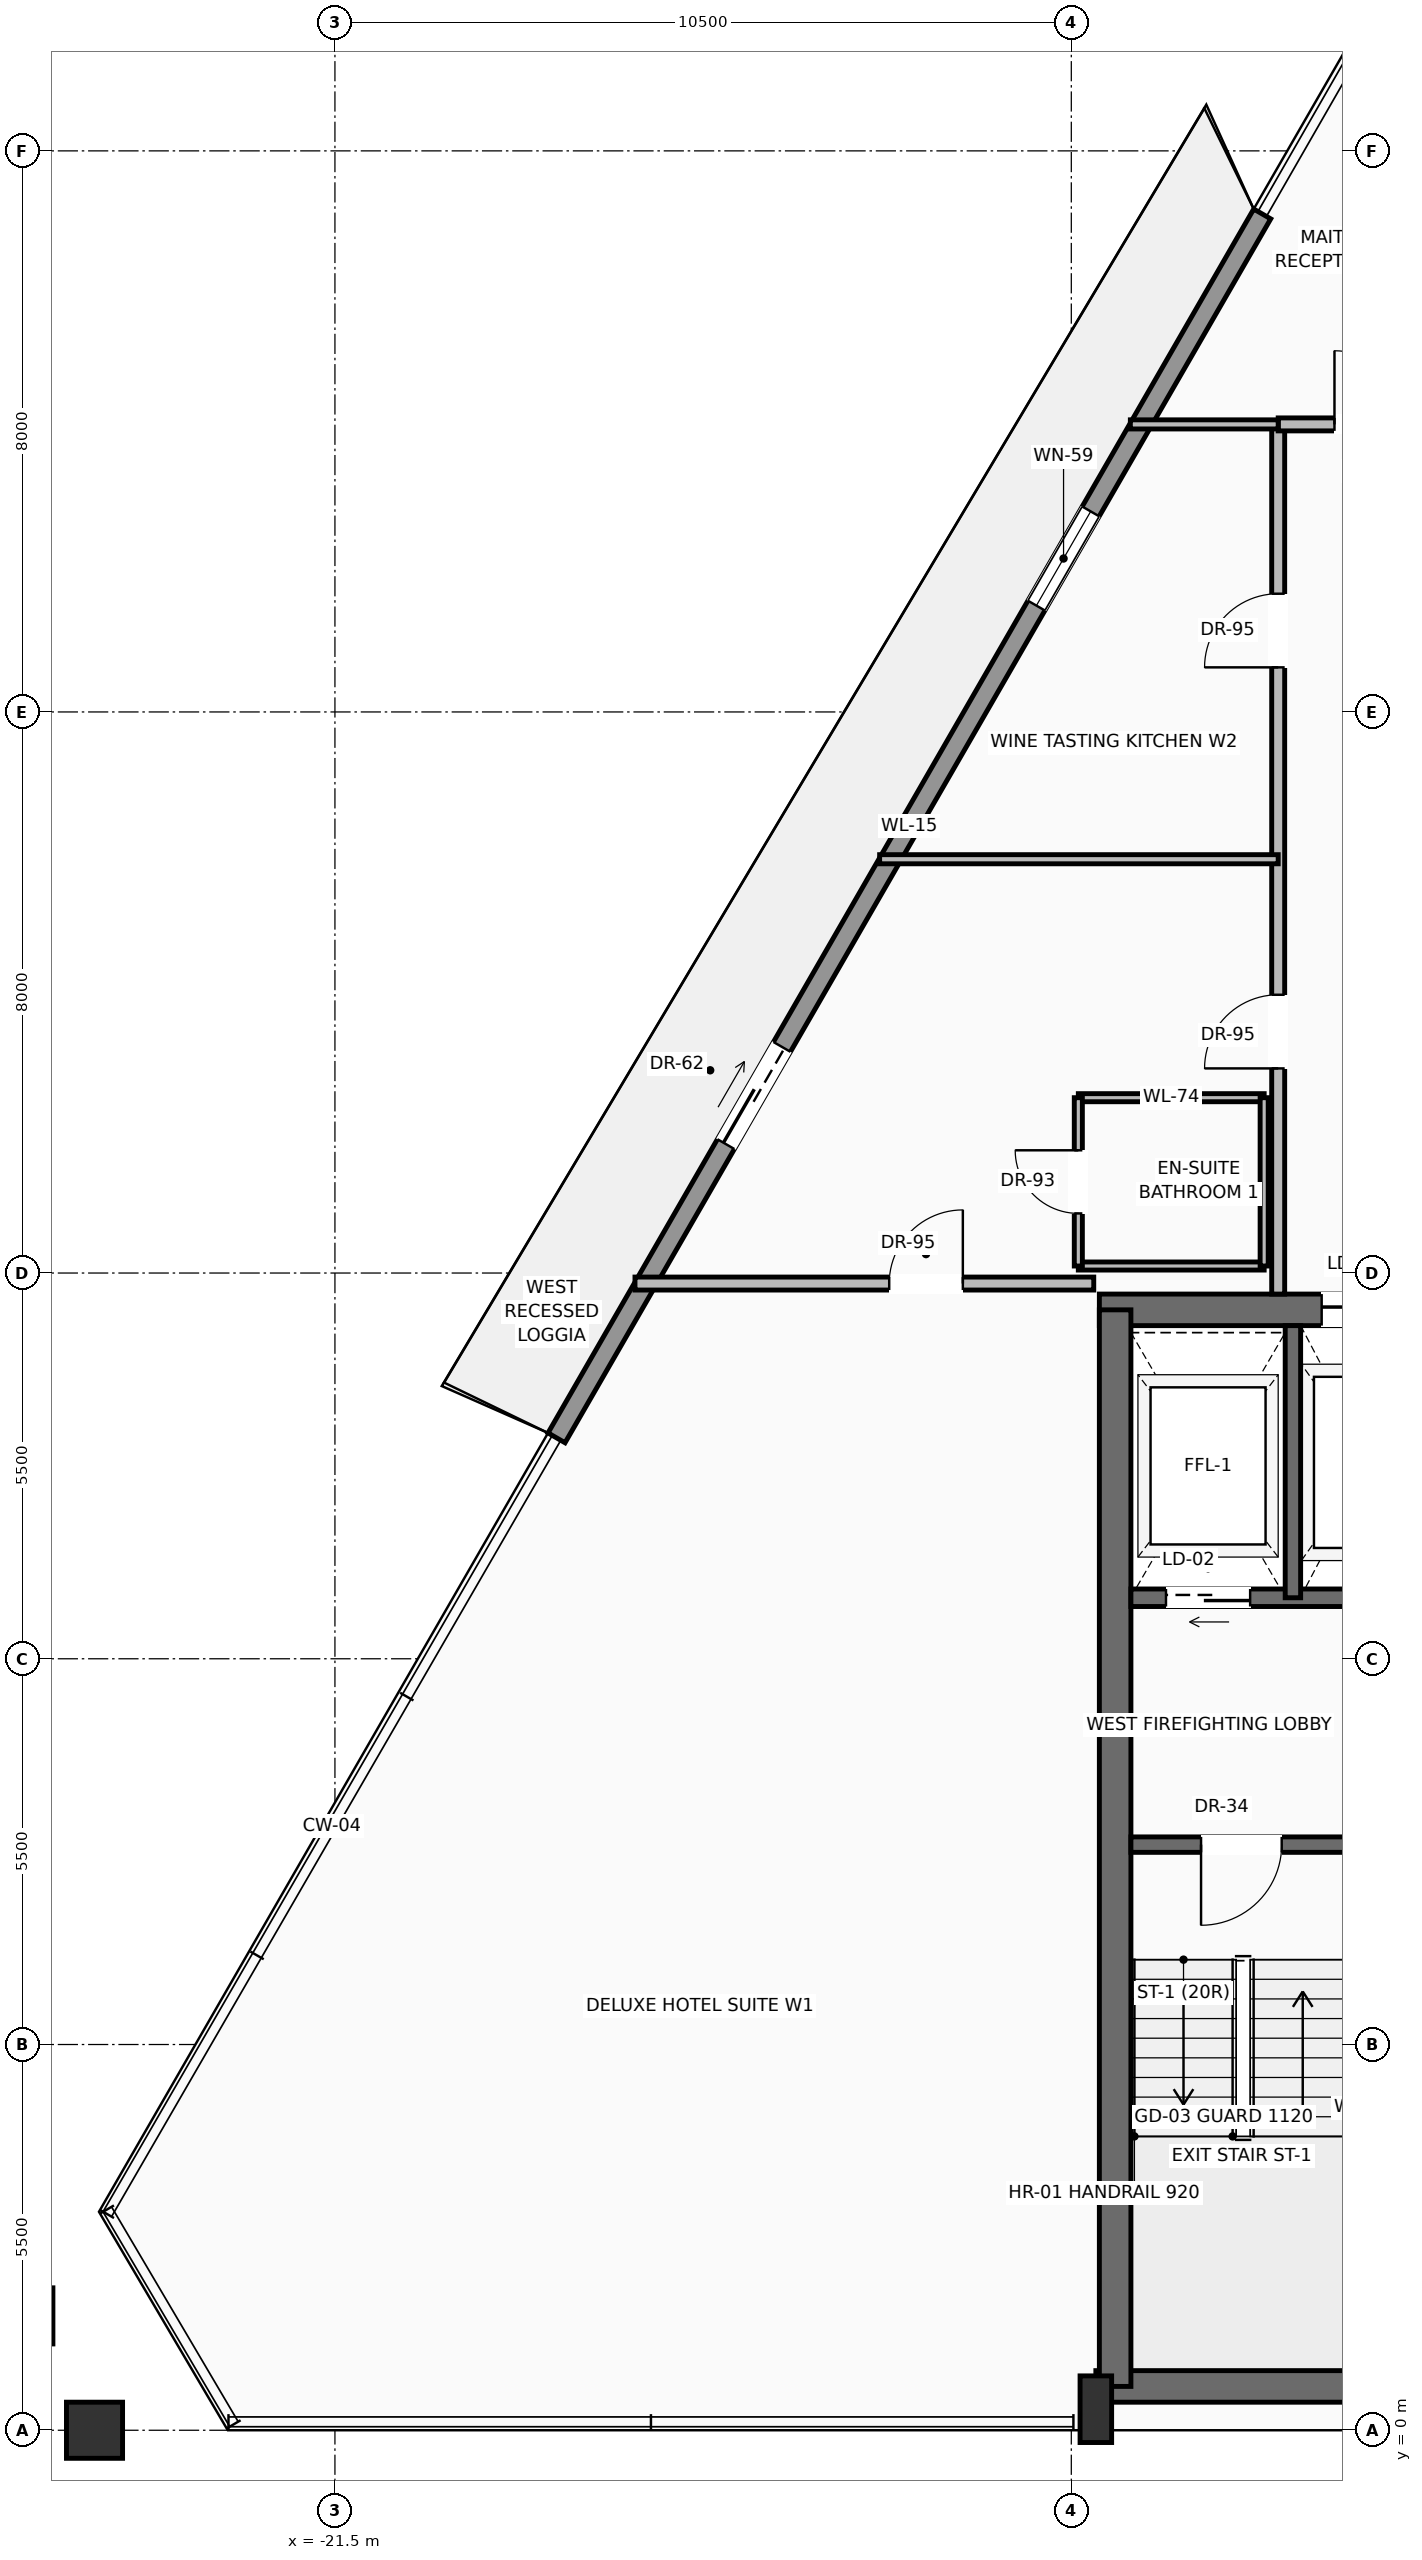
"""IFC4 building model, lengths in metres.
Left out: names, types, materials, properties, quantities, classifications, styles, units other than length and angle.
Written with IfcOpenShell. Run it as: python <this file> out.ifc"""

import sys

from ifc_helpers import new_model, si_unit, direction, frame, frame_2d, origin, origin_2d, place, context, subcontext, project, spatial, rectangle, hollow_rectangle, extrude, source, transform, mapped, element, fill, save


model = new_model("IFC4")
c1 = context("Model", 3, precision=1e-05, world=origin(), true_north=direction((0.0, 1.0)))
c2 = subcontext(c1, "Body", "Model", "MODEL_VIEW")
j1 = project(units=[si_unit("LENGTHUNIT", "METRE"), si_unit("PLANEANGLEUNIT", "RADIAN")], contexts=[c1])
p1 = place(None, origin())
s1 = spatial("IfcSite", under=j1, at=p1, CompositionType="ELEMENT")
p2 = place(p1, origin())
s2 = spatial("IfcBuilding", under=s1, at=p2, CompositionType="ELEMENT")
p3 = place(p2, frame((0.0, 0.0, 279.9)))
s3 = spatial("IfcBuildingStorey", under=s2, at=p3, CompositionType="ELEMENT", Elevation=279.9)
p4 = place(p3, frame((-10.65, 0.625, 0.0), z_axis=(0.0, 0.0, 1.0), x_axis=(1.0, 0.0, 0.0)))
e1 = element("IfcWall", 1, at=p4, inside=s3, PredefinedType="SHEAR", context=c2, shape_type="SweptSolid", body=[
    extrude(rectangle(XDim=21.3, YDim=0.45, at=frame_2d((10.65, 0.0))), origin(), (0.0, 0.0, 1.0), 3.24),
])
p5 = place(p3, frame((-10.6, 15.975, 0.0), z_axis=(0.0, 0.0, 1.0), x_axis=(1.0, 0.0, 0.0)))
e2 = element("IfcWall", 2, at=p5, inside=s3, PredefinedType="SHEAR", context=c2, shape_type="SweptSolid", body=[
    extrude(rectangle(XDim=21.2, YDim=0.45, at=frame_2d((10.6, 0.0))), origin(), (0.0, 0.0, 1.0), 3.24),
])
p6 = place(p5, frame((3.17, 0.0, 0.0)))
e3 = element("IfcOpeningElement", 3, at=p6, cuts=e2, PredefinedType="OPENING", context=c2, shape_type="SweptSolid", body=[
    extrude(rectangle(XDim=1.3, YDim=2.3, at=frame_2d((0.65, 1.15))), frame((0.0, 0.235, 0.0), z_axis=(0.0, -1.0, 0.0), x_axis=(1.0, 0.0, 0.0)), (0.0, 0.0, 1.0), 0.47),
])
p7 = place(p5, frame((9.6, 0.0, 0.0)))
e4 = element("IfcOpeningElement", 4, at=p7, cuts=e2, PredefinedType="OPENING", context=c2, shape_type="SweptSolid", body=[
    extrude(rectangle(XDim=2.0, YDim=2.4, at=frame_2d((1.0, 1.2))), frame((0.0, 0.235, 0.0), z_axis=(0.0, -1.0, 0.0), x_axis=(1.0, 0.0, 0.0)), (0.0, 0.0, 1.0), 0.47),
])
p8 = place(p3, frame((-10.375, 0.625, 0.0), z_axis=(0.0, 0.0, 1.0), x_axis=(0.0, 1.0, 0.0)))
e5 = element("IfcWall", 5, at=p8, inside=s3, PredefinedType="SHEAR", context=c2, shape_type="SweptSolid", body=[
    extrude(rectangle(XDim=15.35, YDim=0.45, at=frame_2d((7.675, 0.0))), origin(), (0.0, 0.0, 1.0), 3.24),
])
m1 = source(origin(), c2, "Body", "SweptSolid", [
    extrude(rectangle(XDim=0.45, YDim=0.95, at=origin_2d()), origin(), (0.0, 0.0, 1.0), 3.45),
])
p9 = place(p3, frame((-10.65, 0.3, 0.0), z_axis=(0.0, 0.0, 1.0), x_axis=(1.0, 0.0, 0.0)))
e6 = element("IfcColumn", 6, at=p9, inside=s3, PredefinedType="PILASTER", context=c2, shape_type="MappedRepresentation", body=[
    mapped(m1, transform((0.0, 0.0, 0.0), scale=1.0)),
])
m2 = source(origin(), c2, "Body", "SweptSolid", [
    extrude(hollow_rectangle(XDim=0.8, YDim=0.8, WallThickness=0.04, at=origin_2d()), origin(), (0.0, 0.0, 1.0), 3.441),
])
p10 = place(p3, frame((-24.928, 0.0, 0.004), z_axis=(0.001560724546, 0.0, 0.999998782069), x_axis=(0.0, 1.0, 0.0)))
e7 = element("IfcColumn", 7, at=p10, inside=s3, PredefinedType="COLUMN", context=c2, shape_type="MappedRepresentation", body=[
    mapped(m2, transform((0.0, 0.0, 0.0), scale=1.0)),
])
m3 = source(origin(), c2, "Body", "SweptSolid", [
    extrude(hollow_rectangle(XDim=0.8, YDim=0.8, WallThickness=0.04, at=origin_2d()), origin(), (0.0, 0.0, 1.0), 3.442),
])
p11 = place(p3, frame((-25.921, 1.631, 0.004), z_axis=(0.012766825134, -0.016384092255, 0.999784261577), x_axis=(0.788800290179, 0.614649576762, 0.0)))
e8 = element("IfcColumn", 8, at=p11, inside=s3, PredefinedType="COLUMN", context=c2, shape_type="MappedRepresentation", body=[
    mapped(m3, transform((0.0, 0.0, 0.0), scale=1.0)),
])
p12 = place(p3, frame((-18.34, 14.15, 0.0), z_axis=(0.0, 0.0, 1.0), x_axis=(0.499519590366, 0.866302590808, 0.0)))
e9 = element("IfcWall", 9, at=p12, inside=s3, PredefinedType="SOLIDWALL", context=c2, shape_type="SweptSolid", body=[
    extrude(rectangle(XDim=20.144, YDim=0.28, at=frame_2d((10.072, 0.0))), origin(), (0.0, 0.0, 1.0), 2.82),
])
p13 = place(p12, frame((4.834, 0.0, 0.0)))
e10 = element("IfcOpeningElement", 10, at=p13, cuts=e9, PredefinedType="OPENING", context=c2, shape_type="SweptSolid", body=[
    extrude(rectangle(XDim=1.6, YDim=2.35, at=frame_2d((0.8, 1.175))), frame((0.0, 0.15, 0.0), z_axis=(0.0, -1.0, 0.0), x_axis=(1.0, 0.0, 0.0)), (0.0, 0.0, 1.0), 0.3),
])
p14 = place(p12, frame((13.698, 0.0, 0.9)))
e11 = element("IfcOpeningElement", 11, at=p14, cuts=e9, PredefinedType="OPENING", context=c2, shape_type="SweptSolid", body=[
    extrude(rectangle(XDim=1.55, YDim=1.75, at=frame_2d((0.775, 0.875))), frame((0.0, 0.15, 0.0), z_axis=(0.0, -1.0, 0.0), x_axis=(1.0, 0.0, 0.0)), (0.0, 0.0, 1.0), 0.3),
])
p15 = place(p3, frame((-5.5, 8.35, 0.0), z_axis=(0.0, 0.0, 1.0), x_axis=(-1.0, 0.0, 0.0)))
e12 = element("IfcWall", 12, at=p15, inside=s3, PredefinedType="SOLIDWALL", context=c2, shape_type="SweptSolid", body=[
    extrude(rectangle(XDim=4.65, YDim=0.22, at=frame_2d((2.325, 0.0))), origin(), (0.0, 0.0, 1.0), 3.24),
])
p16 = place(p15, frame((2.5, 0.0, 0.0)))
e13 = element("IfcOpeningElement", 13, at=p16, cuts=e12, PredefinedType="OPENING", context=c2, shape_type="SweptSolid", body=[
    extrude(rectangle(XDim=1.15, YDim=2.2, at=frame_2d((0.575, 1.1))), frame((0.0, 0.12, 0.0), z_axis=(0.0, -1.0, 0.0), x_axis=(1.0, 0.0, 0.0)), (0.0, 0.0, 1.0), 0.24),
])
p17 = place(p3, frame((-5.5, 11.87, 0.0), z_axis=(0.0, 0.0, 1.0), x_axis=(-1.0, 0.0, 0.0)))
e14 = element("IfcWall", 14, at=p17, inside=s3, PredefinedType="SOLIDWALL", context=c2, shape_type="SweptSolid", body=[
    extrude(rectangle(XDim=4.65, YDim=0.25, at=frame_2d((2.325, 0.0))), origin(), (0.0, 0.0, 1.0), 3.24),
])
p18 = place(p17, frame((2.95, 0.0, 0.0)))
e15 = element("IfcOpeningElement", 15, at=p18, cuts=e14, PredefinedType="OPENING", context=c2, shape_type="SweptSolid", body=[
    extrude(rectangle(XDim=1.2, YDim=2.25, at=frame_2d((0.6, 1.125))), frame((0.0, 0.135, 0.0), z_axis=(0.0, -1.0, 0.0), x_axis=(1.0, 0.0, 0.0)), (0.0, 0.0, 1.0), 0.27),
])
p19 = place(p3, frame((-7.84, 11.87, 0.0), z_axis=(0.0, 0.0, 1.0), x_axis=(0.0, 1.0, 0.0)))
e16 = element("IfcWall", 16, at=p19, inside=s3, PredefinedType="SOLIDWALL", context=c2, shape_type="SweptSolid", body=[
    extrude(rectangle(XDim=3.88, YDim=0.22, at=frame_2d((1.94, 0.0))), origin(), (0.0, 0.0, 1.0), 3.24),
])
p20 = place(p3, frame((-8.05, 16.2, 0.0), z_axis=(0.0, 0.0, 1.0), x_axis=(0.0, 1.0, 0.0)))
e17 = element("IfcWall", 17, at=p20, inside=s3, PredefinedType="PARTITIONING", context=c2, shape_type="SweptSolid", body=[
    extrude(rectangle(XDim=12.4, YDim=0.185, at=frame_2d((6.2, 0.0))), origin(), (0.0, 0.0, 1.0), 3.232),
])
p21 = place(p20, frame((3.218, 0.0, 0.0)))
e18 = element("IfcOpeningElement", 18, at=p21, cuts=e17, PredefinedType="OPENING", context=c2, shape_type="SweptSolid", body=[
    extrude(rectangle(XDim=1.05, YDim=2.25, at=frame_2d((0.525, 1.125))), frame((0.0, 0.103, 0.0), z_axis=(0.0, -1.0, 0.0), x_axis=(1.0, 0.0, 0.0)), (0.0, 0.0, 1.0), 0.205),
])
p22 = place(p20, frame((8.936, 0.0, 0.0)))
e19 = element("IfcOpeningElement", 19, at=p22, cuts=e17, PredefinedType="OPENING", context=c2, shape_type="SweptSolid", body=[
    extrude(rectangle(XDim=1.05, YDim=2.25, at=frame_2d((0.525, 1.125))), frame((0.0, 0.103, 0.0), z_axis=(0.0, -1.0, 0.0), x_axis=(1.0, 0.0, 0.0)), (0.0, 0.0, 1.0), 0.205),
])
p23 = place(p3, frame((-8.05, 28.6, 0.0), z_axis=(0.0, 0.0, 1.0), x_axis=(1.0, 0.0, 0.0)))
e20 = element("IfcWall", 20, at=p23, inside=s3, PredefinedType="PARTITIONING", context=c2, shape_type="SweptSolid", body=[
    extrude(rectangle(XDim=16.65, YDim=0.185, at=frame_2d((8.325, 0.0))), origin(), (0.0, 0.0, 1.0), 3.232),
])
p24 = place(p23, frame((3.248, 0.0, 0.0)))
e21 = element("IfcOpeningElement", 21, at=p24, cuts=e20, PredefinedType="OPENING", context=c2, shape_type="SweptSolid", body=[
    extrude(rectangle(XDim=1.05, YDim=2.25, at=frame_2d((0.525, 1.125))), frame((0.0, 0.103, 0.0), z_axis=(0.0, -1.0, 0.0), x_axis=(1.0, 0.0, 0.0)), (0.0, 0.0, 1.0), 0.205),
])
p25 = place(p23, frame((7.8, 0.0, 0.0)))
e22 = element("IfcOpeningElement", 22, at=p25, cuts=e20, PredefinedType="OPENING", context=c2, shape_type="SweptSolid", body=[
    extrude(rectangle(XDim=1.05, YDim=2.25, at=frame_2d((0.525, 1.125))), frame((0.0, 0.103, 0.0), z_axis=(0.0, -1.0, 0.0), x_axis=(1.0, 0.0, 0.0)), (0.0, 0.0, 1.0), 0.205),
])
p26 = place(p23, frame((11.802, 0.0, 0.0)))
e23 = element("IfcOpeningElement", 23, at=p26, cuts=e20, PredefinedType="OPENING", context=c2, shape_type="SweptSolid", body=[
    extrude(rectangle(XDim=1.05, YDim=2.25, at=frame_2d((0.525, 1.125))), frame((0.0, 0.103, 0.0), z_axis=(0.0, -1.0, 0.0), x_axis=(1.0, 0.0, 0.0)), (0.0, 0.0, 1.0), 0.205),
])
p27 = place(p23, frame((0.802, 0.0, 0.0)))
e24 = element("IfcOpeningElement", 24, at=p27, cuts=e20, PredefinedType="OPENING", context=c2, shape_type="SweptSolid", body=[
    extrude(rectangle(XDim=1.05, YDim=2.25, at=frame_2d((0.525, 1.125))), frame((0.0, 0.103, 0.0), z_axis=(0.0, -1.0, 0.0), x_axis=(1.0, 0.0, 0.0)), (0.0, 0.0, 1.0), 0.205),
])
p28 = place(p3, frame((-17.222, 16.35, 0.0), z_axis=(0.0, 0.0, 1.0), x_axis=(1.0, 0.0, 0.0)))
e25 = element("IfcWall", 25, at=p28, inside=s3, PredefinedType="PARTITIONING", context=c2, shape_type="SweptSolid", body=[
    extrude(rectangle(XDim=6.542, YDim=0.185, at=frame_2d((3.271, 0.0))), origin(), (0.0, 0.0, 1.0), 3.232),
])
p29 = place(p28, frame((3.625, 0.0, 0.0)))
e26 = element("IfcOpeningElement", 26, at=p29, cuts=e25, PredefinedType="OPENING", context=c2, shape_type="SweptSolid", body=[
    extrude(rectangle(XDim=1.05, YDim=2.25, at=frame_2d((0.525, 1.125))), frame((0.0, 0.103, 0.0), z_axis=(0.0, -1.0, 0.0), x_axis=(1.0, 0.0, 0.0)), (0.0, 0.0, 1.0), 0.205),
])
p30 = place(p3, frame((-10.158, 28.6, 0.0), z_axis=(0.0, 0.0, 1.0), x_axis=(1.0, 0.0, 0.0)))
e27 = element("IfcWall", 27, at=p30, inside=s3, PredefinedType="PARTITIONING", context=c2, shape_type="SweptSolid", body=[
    extrude(rectangle(XDim=2.108, YDim=0.13, at=frame_2d((1.054, 0.0))), origin(), (0.0, 0.0, 1.0), 3.232),
])
for number, where, z_axis, x_axis in (
    (28, (-10.9, 16.6, 0.0), (0.0, 0.0, 1.0), (1.0, 0.0, 0.0)),
    (29, (-10.9, 19.0, 0.0), (0.0, 0.0, 1.0), (1.0, 0.0, 0.0)),
):
    element("IfcWall", number, at=place(p3, frame(where, z_axis=z_axis, x_axis=x_axis)), inside=s3, PredefinedType="PARTITIONING", context=c2, shape_type="SweptSolid", body=[
        extrude(rectangle(XDim=2.65, YDim=0.115, at=frame_2d((1.325, 0.0))), origin(), (0.0, 0.0, 1.0), 3.232),
    ])
p31 = place(p3, frame((-10.9, 16.6, 0.0), z_axis=(0.0, 0.0, 1.0), x_axis=(0.0, 1.0, 0.0)))
e30 = element("IfcWall", 30, at=p31, inside=s3, PredefinedType="PARTITIONING", context=c2, shape_type="SweptSolid", body=[
    extrude(rectangle(XDim=2.4, YDim=0.115, at=frame_2d((1.2, 0.0))), origin(), (0.0, 0.0, 1.0), 3.232),
])
p32 = place(p31, frame((0.75, 0.0, 0.0)))
e31 = element("IfcOpeningElement", 31, at=p32, cuts=e30, PredefinedType="OPENING", context=c2, shape_type="SweptSolid", body=[
    extrude(rectangle(XDim=0.9, YDim=2.15, at=frame_2d((0.45, 1.075))), frame((0.0, 0.067, 0.0), z_axis=(0.0, -1.0, 0.0), x_axis=(1.0, 0.0, 0.0)), (0.0, 0.0, 1.0), 0.135),
])
p33 = place(p3, frame((-8.25, 16.6, 0.0), z_axis=(0.0, 0.0, 1.0), x_axis=(0.0, 1.0, 0.0)))
e32 = element("IfcWall", 32, at=p33, inside=s3, PredefinedType="PARTITIONING", context=c2, shape_type="SweptSolid", body=[
    extrude(rectangle(XDim=2.4, YDim=0.115, at=frame_2d((1.2, 0.0))), origin(), (0.0, 0.0, 1.0), 3.232),
])
p34 = place(p3, frame((-13.733, 22.4, 0.0), z_axis=(0.0, 0.0, 1.0), x_axis=(1.0, 0.0, 0.0)))
e33 = element("IfcWall", 33, at=p34, inside=s3, PredefinedType="PARTITIONING", context=c2, shape_type="SweptSolid", body=[
    extrude(rectangle(XDim=5.683, YDim=0.13, at=frame_2d((2.842, 0.0))), origin(), (0.0, 0.0, 1.0), 3.232),
])
m4 = source(origin(), c2, "Body", "SweptSolid", [
    extrude(rectangle(XDim=1.6, YDim=2.35, at=frame_2d((0.8, 1.175))), frame((0.0, 0.025, 0.0), z_axis=(0.0, -1.0, 0.0), x_axis=(1.0, 0.0, 0.0)), (0.0, 0.0, 1.0), 0.05),
])
p35 = place(p13, origin())
e34 = element("IfcDoor", 34, at=p35, inside=s3, OperationType="SLIDING_TO_LEFT", PredefinedType="DOOR", context=c2, shape_type="MappedRepresentation", body=[
    mapped(m4, transform((0.0, 0.0, 0.0), scale=1.0)),
])
fill(e10, e34)
m5 = source(origin(), c2, "Body", "SweptSolid", [
    extrude(rectangle(XDim=1.55, YDim=1.75, at=frame_2d((0.775, 0.875))), frame((0.0, 0.03, 0.0), z_axis=(0.0, -1.0, 0.0), x_axis=(1.0, 0.0, 0.0)), (0.0, 0.0, 1.0), 0.06),
])
p36 = place(p14, origin())
e35 = element("IfcWindow", 35, at=p36, inside=s3, PartitioningType="SINGLE_PANEL", PredefinedType="WINDOW", context=c2, shape_type="MappedRepresentation", body=[
    mapped(m5, transform((0.0, 0.0, 0.0), scale=1.0)),
])
fill(e11, e35)
m6 = source(origin(), c2, "Body", "SweptSolid", [
    extrude(rectangle(XDim=1.15, YDim=2.2, at=frame_2d((0.575, 1.1))), frame((0.0, 0.025, 0.0), z_axis=(0.0, -1.0, 0.0), x_axis=(1.0, 0.0, 0.0)), (0.0, 0.0, 1.0), 0.05),
])
p37 = place(p16, origin())
e36 = element("IfcDoor", 36, at=p37, inside=s3, OperationType="SINGLE_SWING_RIGHT", PredefinedType="DOOR", context=c2, shape_type="MappedRepresentation", body=[
    mapped(m6, transform((0.0, 0.0, 0.0), scale=1.0)),
])
fill(e13, e36)
m7 = source(origin(), c2, "Body", "SweptSolid", [
    extrude(rectangle(XDim=1.2, YDim=2.25, at=frame_2d((0.6, 1.125))), frame((0.0, 0.025, 0.0), z_axis=(0.0, -1.0, 0.0), x_axis=(1.0, 0.0, 0.0)), (0.0, 0.0, 1.0), 0.05),
])
p38 = place(p18, origin())
e37 = element("IfcDoor", 37, at=p38, inside=s3, OperationType="SLIDING_TO_LEFT", PredefinedType="DOOR", context=c2, shape_type="MappedRepresentation", body=[
    mapped(m7, transform((0.0, 0.0, 0.0), scale=1.0)),
])
fill(e15, e37)
m8 = source(origin(), c2, "Body", "SweptSolid", [
    extrude(rectangle(XDim=1.3, YDim=2.3, at=frame_2d((0.65, 1.15))), frame((0.0, 0.025, 0.0), z_axis=(0.0, -1.0, 0.0), x_axis=(1.0, 0.0, 0.0)), (0.0, 0.0, 1.0), 0.05),
])
p39 = place(p6, origin())
e38 = element("IfcDoor", 38, at=p39, inside=s3, OperationType="SLIDING_TO_RIGHT", PredefinedType="DOOR", context=c2, shape_type="MappedRepresentation", body=[
    mapped(m8, transform((0.0, 0.0, 0.0), scale=1.0)),
])
fill(e3, e38)
m9 = source(origin(), c2, "Body", "SweptSolid", [
    extrude(rectangle(XDim=1.05, YDim=2.25, at=frame_2d((0.525, 1.125))), frame((0.0, 0.025, 0.0), z_axis=(0.0, -1.0, 0.0), x_axis=(1.0, 0.0, 0.0)), (0.0, 0.0, 1.0), 0.05),
])
p40 = place(p29, origin())
e39 = element("IfcDoor", 39, at=p40, inside=s3, OperationType="SINGLE_SWING_RIGHT", PredefinedType="DOOR", context=c2, shape_type="MappedRepresentation", body=[
    mapped(m9, transform((0.0, 0.0, 0.0), scale=1.0)),
])
fill(e26, e39)
p41 = place(p21, origin())
e40 = element("IfcDoor", 40, at=p41, inside=s3, OperationType="SINGLE_SWING_LEFT", PredefinedType="DOOR", context=c2, shape_type="MappedRepresentation", body=[
    mapped(m9, transform((0.0, 0.0, 0.0), scale=1.0)),
])
fill(e18, e40)
m10 = source(origin(), c2, "Body", "SweptSolid", [
    extrude(rectangle(XDim=0.9, YDim=2.15, at=frame_2d((0.45, 1.075))), frame((0.0, 0.025, 0.0), z_axis=(0.0, -1.0, 0.0), x_axis=(1.0, 0.0, 0.0)), (0.0, 0.0, 1.0), 0.05),
])
p42 = place(p32, origin())
e41 = element("IfcDoor", 41, at=p42, inside=s3, OperationType="SINGLE_SWING_RIGHT", PredefinedType="DOOR", context=c2, shape_type="MappedRepresentation", body=[
    mapped(m10, transform((0.0, 0.0, 0.0), scale=1.0)),
])
fill(e31, e41)
p43 = place(p22, origin())
e42 = element("IfcDoor", 42, at=p43, inside=s3, OperationType="SINGLE_SWING_LEFT", PredefinedType="DOOR", context=c2, shape_type="MappedRepresentation", body=[
    mapped(m9, transform((0.0, 0.0, 0.0), scale=1.0)),
])
fill(e19, e42)
p44 = place(p27, origin())
e43 = element("IfcDoor", 43, at=p44, inside=s3, OperationType="SINGLE_SWING_LEFT", PredefinedType="DOOR", context=c2, shape_type="MappedRepresentation", body=[
    mapped(m9, transform((0.0, 0.0, 0.0), scale=1.0)),
])
fill(e24, e43)
save(model, sys.argv[1])
